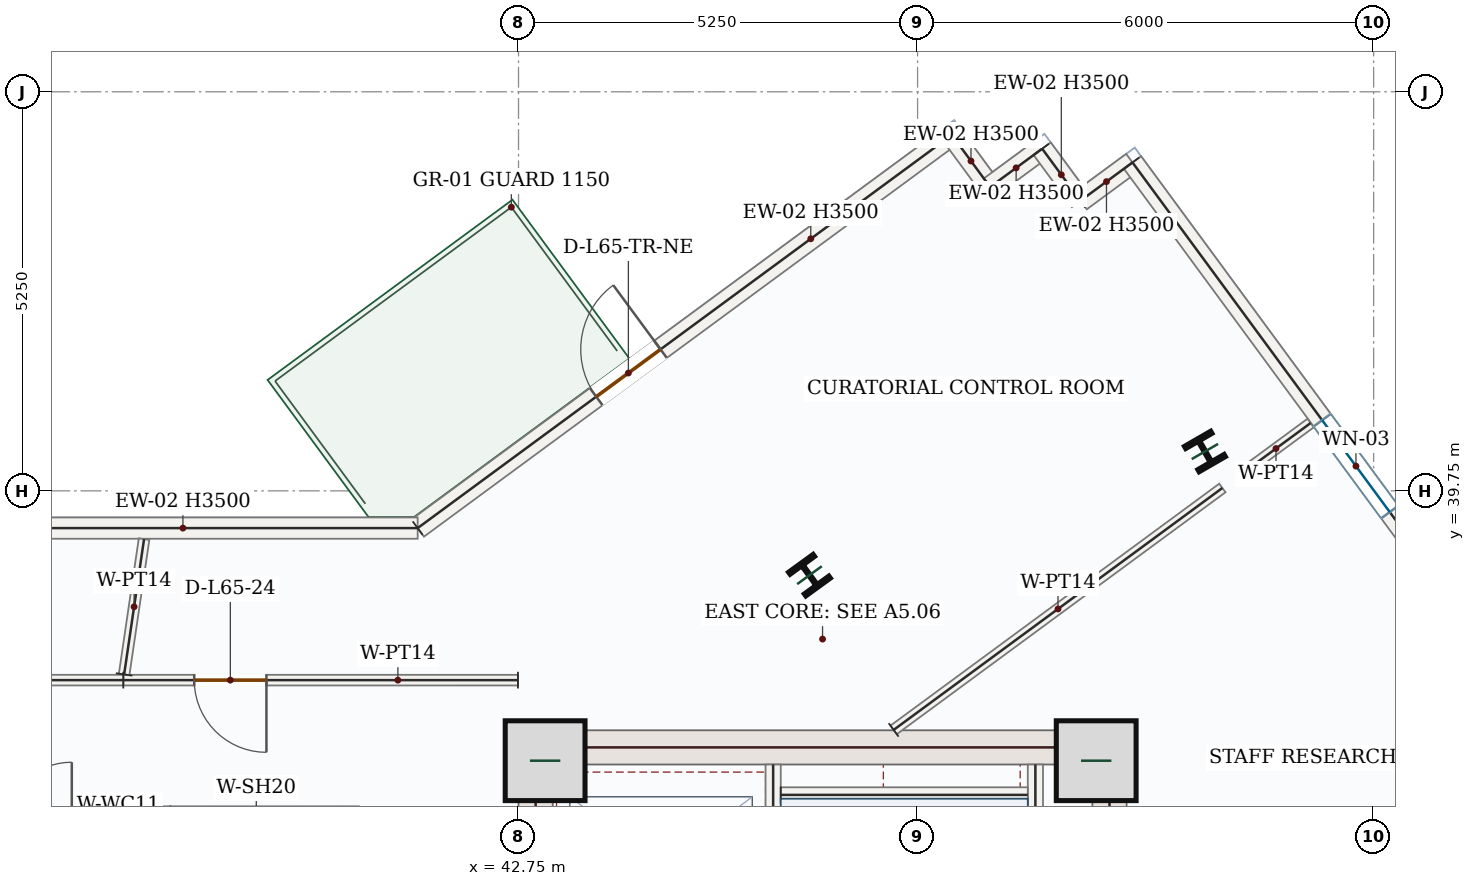
"""IFC4 building model, lengths in metres.
Left out: names, types, materials, properties, quantities, classifications, styles, units other than length and angle.
Written with IfcOpenShell. Run it as: python <this file> out.ifc"""

import sys

from ifc_helpers import new_model, si_unit, direction, frame, frame_2d, origin, origin_2d, place, context, subcontext, project, spatial, rectangle, i_section, extrude, source, transform, mapped, element, fill, save


model = new_model("IFC4")
c1 = context("Model", 3, precision=1e-05, world=origin(), true_north=direction((0.0, 1.0)))
c2 = subcontext(c1, "Body", "Model", "MODEL_VIEW")
j1 = project(units=[si_unit("LENGTHUNIT", "METRE"), si_unit("PLANEANGLEUNIT", "RADIAN")], contexts=[c1])
p1 = place(None, origin())
s1 = spatial("IfcSite", under=j1, at=p1, CompositionType="ELEMENT")
p2 = place(p1, origin())
s2 = spatial("IfcBuilding", under=s1, at=p2, CompositionType="ELEMENT")
p3 = place(p2, frame((0.0, 0.0, 272.85)))
s3 = spatial("IfcBuildingStorey", under=s2, at=p3, CompositionType="ELEMENT", Elevation=272.85)
p4 = place(p3, frame((42.975, 28.05, 0.0), z_axis=(0.0, 0.0, 1.0), x_axis=(0.0, 1.0, 0.0)))
e1 = element("IfcWall", 1, at=p4, inside=s3, PredefinedType="SHEAR", context=c2, shape_type="SweptSolid", body=[
    extrude(rectangle(XDim=8.55, YDim=0.45, at=frame_2d((4.275, 0.0))), origin(), (0.0, 0.0, 1.0), 3.5),
])
p5 = place(p4, frame((1.5, 0.0, 0.0)))
e2 = element("IfcOpeningElement", 2, at=p5, cuts=e1, PredefinedType="OPENING", context=c2, shape_type="SweptSolid", body=[
    extrude(rectangle(XDim=1.1, YDim=2.2, at=frame_2d((0.55, 1.1))), frame((0.0, 0.235, 0.0), z_axis=(0.0, -1.0, 0.0), x_axis=(1.0, 0.0, 0.0)), (0.0, 0.0, 1.0), 0.47),
])
m1 = source(origin(), c2, "Body", "SweptSolid", [
    extrude(rectangle(XDim=8.55, YDim=0.45, at=frame_2d((4.275, 0.0))), origin(), (0.0, 0.0, 1.0), 3.5),
])
p6 = place(p3, frame((50.525, 28.05, 0.0), z_axis=(0.0, 0.0, 1.0), x_axis=(0.0, 1.0, 0.0)))
e3 = element("IfcWall", 3, at=p6, inside=s3, PredefinedType="SHEAR", context=c2, shape_type="MappedRepresentation", body=[
    mapped(m1, transform((0.0, 0.0, 0.0), x_axis=(1.0, 0.0, 0.0), y_axis=(0.0, 1.0, 0.0), z_axis=(0.0, 0.0, 1.0), scale=1.0)),
])
m2 = source(origin(), c2, "Body", "SweptSolid", [
    extrude(rectangle(XDim=7.1, YDim=0.45, at=frame_2d((3.55, 0.0))), origin(), (0.0, 0.0, 1.0), 3.5),
])
p7 = place(p3, frame((43.2, 36.375, 0.0), z_axis=(0.0, 0.0, 1.0), x_axis=(1.0, 0.0, 0.0)))
e4 = element("IfcWall", 4, at=p7, inside=s3, PredefinedType="SHEAR", context=c2, shape_type="MappedRepresentation", body=[
    mapped(m2, transform((0.0, 0.0, 0.0), x_axis=(1.0, 0.0, 0.0), y_axis=(0.0, 1.0, 0.0), z_axis=(0.0, 0.0, 1.0), scale=1.0)),
])
m3 = source(origin(), c2, "Body", "SweptSolid", [
    extrude(rectangle(XDim=1.05, YDim=1.05, at=origin_2d()), origin(), (0.0, 0.0, 1.0), 3.75),
])
for number, where, z_axis, x_axis in (
    (5, (43.1, 36.2, 0.0), (0.0, 0.0, 1.0), (1.0, 0.0, 0.0)),
    (6, (50.35, 36.2, 0.0), (0.0, 0.0, 1.0), (1.0, 0.0, 0.0)),
):
    element("IfcColumn", number, at=place(p3, frame(where, z_axis=z_axis, x_axis=x_axis)), inside=s3, PredefinedType="COLUMN", context=c2, shape_type="MappedRepresentation", body=[
        mapped(m3, transform((0.0, 0.0, 0.0), x_axis=(1.0, 0.0, 0.0), y_axis=(0.0, 1.0, 0.0), z_axis=(0.0, 0.0, 1.0), scale=1.0)),
    ])
m4 = source(origin(), c2, "Body", "SweptSolid", [
    extrude(i_section(OverallWidth=0.399, OverallDepth=0.386, WebThickness=0.021, FlangeThickness=0.033, FilletRadius=0.018, at=origin_2d()), origin(), (0.0, 0.0, 1.0), 3.75),
])
for number, where, z_axis, x_axis in (
    (7, (46.578, 38.641, 0.0), (0.0, 0.0, 1.0), (0.809, 0.588, 0.0)),
    (8, (51.78, 40.268, 0.0), (0.0, 0.0, 1.0), (0.866, 0.5, 0.0)),
):
    element("IfcColumn", number, at=place(p3, frame(where, z_axis=z_axis, x_axis=x_axis)), inside=s3, PredefinedType="COLUMN", context=c2, shape_type="MappedRepresentation", body=[
        mapped(m4, transform((0.0, 0.0, 0.0), x_axis=(1.0, 0.0, 0.0), y_axis=(0.0, 1.0, 0.0), z_axis=(0.0, 0.0, 1.0), scale=1.0)),
    ])
p8 = place(p3, frame((41.423, 39.26, 0.0), z_axis=(0.0, 0.0, 1.0), x_axis=(0.805403112922, 0.592727446383, 0.0)))
e9 = element("IfcWall", 9, at=p8, inside=s3, PredefinedType="SOLIDWALL", context=c2, shape_type="SweptSolid", body=[
    extrude(rectangle(XDim=8.726, YDim=0.28, at=frame_2d((4.363, 0.0))), origin(), (0.0, 0.0, 1.0), 3.5),
])
p9 = place(p8, frame((2.917, 0.0, 0.0)))
e10 = element("IfcOpeningElement", 10, at=p9, cuts=e9, PredefinedType="OPENING", context=c2, shape_type="SweptSolid", body=[
    extrude(rectangle(XDim=1.05, YDim=2.15, at=frame_2d((0.525, 1.075))), frame((0.0, 0.15, 0.0), z_axis=(0.0, -1.0, 0.0), x_axis=(1.0, 0.0, 0.0)), (0.0, 0.0, 1.0), 0.3),
])
m5 = source(origin(), c2, "Body", "SweptSolid", [
    extrude(rectangle(XDim=0.85, YDim=0.28, at=frame_2d((0.425, 0.0))), origin(), (0.0, 0.0, 1.0), 3.5),
])
p10 = place(p3, frame((48.451, 44.432, 0.0), z_axis=(0.0, 0.0, 1.0), x_axis=(0.592807079659, -0.80534450163, 0.0)))
e11 = element("IfcWall", 11, at=p10, inside=s3, PredefinedType="SOLIDWALL", context=c2, shape_type="MappedRepresentation", body=[
    mapped(m5, transform((0.0, 0.0, 0.0), x_axis=(1.0, 0.0, 0.0), y_axis=(0.0, 1.0, 0.0), z_axis=(0.0, 0.0, 1.0), scale=1.0)),
])
m6 = source(origin(), c2, "Body", "SweptSolid", [
    extrude(rectangle(XDim=0.85, YDim=0.28, at=frame_2d((0.425, 0.0))), origin(), (0.0, 0.0, 1.0), 3.5),
])
for number, where, z_axis, x_axis in (
    (12, (48.955, 43.747, 0.0), (0.0, 0.0, 1.0), (0.805, 0.593, 0.0)),
    (13, (49.639, 44.251, 0.0), (0.0, 0.0, 1.0), (0.593, -0.805, 0.0)),
):
    element("IfcWall", number, at=place(p3, frame(where, z_axis=z_axis, x_axis=x_axis)), inside=s3, PredefinedType="SOLIDWALL", context=c2, shape_type="MappedRepresentation", body=[
        mapped(m6, transform((0.0, 0.0, 0.0), x_axis=(1.0, 0.0, 0.0), y_axis=(0.0, 1.0, 0.0), z_axis=(0.0, 0.0, 1.0), scale=1.0)),
    ])
p11 = place(p3, frame((50.143, 43.566, 0.0), z_axis=(0.0, 0.0, 1.0), x_axis=(0.80534450163, 0.592807079659, 0.0)))
e14 = element("IfcWall", 14, at=p11, inside=s3, PredefinedType="SOLIDWALL", context=c2, shape_type="MappedRepresentation", body=[
    mapped(m5, transform((0.0, 0.0, 0.0), x_axis=(1.0, 0.0, 0.0), y_axis=(0.0, 1.0, 0.0), z_axis=(0.0, 0.0, 1.0), scale=1.0)),
])
p12 = place(p3, frame((50.827, 44.07, 0.0), z_axis=(0.0, 0.0, 1.0), x_axis=(0.592722097771, -0.805407049146, 0.0)))
e15 = element("IfcWall", 15, at=p12, inside=s3, PredefinedType="SOLIDWALL", context=c2, shape_type="SweptSolid", body=[
    extrude(rectangle(XDim=9.92, YDim=0.28, at=frame_2d((4.96, 0.0))), origin(), (0.0, 0.0, 1.0), 3.5),
])
p13 = place(p12, frame((4.21, 0.0, 0.85)))
e16 = element("IfcOpeningElement", 16, at=p13, cuts=e15, PredefinedType="OPENING", context=c2, shape_type="SweptSolid", body=[
    extrude(rectangle(XDim=1.5, YDim=1.5, at=frame_2d((0.75, 0.75))), frame((0.0, 0.15, 0.0), z_axis=(0.0, -1.0, 0.0), x_axis=(1.0, 0.0, 0.0)), (0.0, 0.0, 1.0), 0.3),
])
m7 = source(origin(), c2, "Body", "SweptSolid", [
    extrude(rectangle(XDim=6.177, YDim=0.28, at=frame_2d((3.088, 0.0))), origin(), (0.0, 0.0, 1.0), 3.5),
])
p14 = place(p3, frame((35.247, 39.26, 0.0), z_axis=(0.0, 0.0, 1.0), x_axis=(1.0, 0.0, 0.0)))
e17 = element("IfcWall", 17, at=p14, inside=s3, PredefinedType="SOLIDWALL", context=c2, shape_type="MappedRepresentation", body=[
    mapped(m7, transform((0.0, 0.0, 0.0), x_axis=(1.0, 0.0, 0.0), y_axis=(0.0, 1.0, 0.0), z_axis=(0.0, 0.0, 1.0), scale=1.0)),
])
m8 = source(origin(), c2, "Body", "SweptSolid", [
    extrude(rectangle(XDim=7.87, YDim=0.2, at=frame_2d((3.935, 0.0))), origin(), (0.0, 0.0, 1.0), 3.5),
])
p15 = place(p3, frame((49.55, 28.28, 0.0), z_axis=(0.0, 0.0, 1.0), x_axis=(0.0, 1.0, 0.0)))
e18 = element("IfcWall", 18, at=p15, inside=s3, PredefinedType="SOLIDWALL", context=c2, shape_type="MappedRepresentation", body=[
    mapped(m8, transform((0.0, 0.0, 0.0), x_axis=(1.0, 0.0, 0.0), y_axis=(0.0, 1.0, 0.0), z_axis=(0.0, 0.0, 1.0), scale=1.0)),
])
p16 = place(p3, frame((46.1, 28.15, 0.0), z_axis=(0.0, 0.0, 1.0), x_axis=(0.0, 1.0, 0.0)))
e19 = element("IfcWall", 19, at=p16, inside=s3, PredefinedType="SOLIDWALL", context=c2, shape_type="SweptSolid", body=[
    extrude(rectangle(XDim=8.0, YDim=0.2, at=frame_2d((4.0, 0.0))), origin(), (0.0, 0.0, 1.0), 3.5),
])
p17 = place(p16, frame((0.4, 0.0, 0.0)))
e20 = element("IfcOpeningElement", 20, at=p17, cuts=e19, PredefinedType="OPENING", context=c2, shape_type="SweptSolid", body=[
    extrude(rectangle(XDim=1.05, YDim=2.15, at=frame_2d((0.525, 1.075))), frame((0.0, 0.11, 0.0), z_axis=(0.0, -1.0, 0.0), x_axis=(1.0, 0.0, 0.0)), (0.0, 0.0, 1.0), 0.22),
])
m9 = source(origin(), c2, "Body", "SweptSolid", [
    extrude(rectangle(XDim=3.25, YDim=0.2, at=frame_2d((1.625, 0.0))), origin(), (0.0, 0.0, 1.0), 3.5),
])
p18 = place(p3, frame((46.2, 35.75, 0.0), z_axis=(0.0, 0.0, 1.0), x_axis=(1.0, 0.0, 0.0)))
e21 = element("IfcWall", 21, at=p18, inside=s3, PredefinedType="SOLIDWALL", context=c2, shape_type="MappedRepresentation", body=[
    mapped(m9, transform((0.0, 0.0, 0.0), x_axis=(1.0, 0.0, 0.0), y_axis=(0.0, 1.0, 0.0), z_axis=(0.0, 0.0, 1.0), scale=1.0)),
])
m10 = source(origin(), c2, "Body", "SweptSolid", [
    extrude(rectangle(XDim=2.4, YDim=0.2, at=frame_2d((1.2, 0.0))), origin(), (0.0, 0.0, 1.0), 3.5),
])
p19 = place(p3, frame((38.05, 33.2, 0.0), z_axis=(0.0, 0.0, 1.0), x_axis=(0.0, 1.0, 0.0)))
e22 = element("IfcWall", 22, at=p19, inside=s3, PredefinedType="SOLIDWALL", context=c2, shape_type="MappedRepresentation", body=[
    mapped(m10, transform((0.0, 0.0, 0.0), x_axis=(1.0, 0.0, 0.0), y_axis=(0.0, 1.0, 0.0), z_axis=(0.0, 0.0, 1.0), scale=1.0)),
])
p20 = place(p3, frame((40.55, 33.2, 0.0), z_axis=(0.0, 0.0, 1.0), x_axis=(0.0, 1.0, 0.0)))
e23 = element("IfcWall", 23, at=p20, inside=s3, PredefinedType="SOLIDWALL", context=c2, shape_type="SweptSolid", body=[
    extrude(rectangle(XDim=2.4, YDim=0.2, at=frame_2d((1.2, 0.0))), origin(), (0.0, 0.0, 1.0), 3.5),
])
p21 = place(p20, frame((0.65, 0.0, 0.0)))
e24 = element("IfcOpeningElement", 24, at=p21, cuts=e23, PredefinedType="OPENING", context=c2, shape_type="SweptSolid", body=[
    extrude(rectangle(XDim=1.1, YDim=2.15, at=frame_2d((0.55, 1.075))), frame((0.0, 0.11, 0.0), z_axis=(0.0, -1.0, 0.0), x_axis=(1.0, 0.0, 0.0)), (0.0, 0.0, 1.0), 0.22),
])
m11 = source(origin(), c2, "Body", "SweptSolid", [
    extrude(rectangle(XDim=5.37, YDim=0.14, at=frame_2d((2.685, 0.0))), origin(), (0.0, 0.0, 1.0), 3.5),
])
p22 = place(p3, frame((47.685, 36.605, 0.0), z_axis=(0.0, 0.0, 1.0), x_axis=(0.805412248971, 0.592715032041, 0.0)))
e25 = element("IfcWall", 25, at=p22, inside=s3, PredefinedType="PARTITIONING", context=c2, shape_type="MappedRepresentation", body=[
    mapped(m11, transform((0.0, 0.0, 0.0), x_axis=(1.0, 0.0, 0.0), y_axis=(0.0, 1.0, 0.0), z_axis=(0.0, 0.0, 1.0), scale=1.0)),
])
m12 = source(origin(), c2, "Body", "SweptSolid", [
    extrude(rectangle(XDim=1.13, YDim=0.14, at=frame_2d((0.565, 0.0))), origin(), (0.0, 0.0, 1.0), 3.5),
])
p23 = place(p3, frame((52.26, 39.972, 0.0), z_axis=(0.0, 0.0, 1.0), x_axis=(0.805359802525, 0.592786292416, 0.0)))
e26 = element("IfcWall", 26, at=p23, inside=s3, PredefinedType="PARTITIONING", context=c2, shape_type="MappedRepresentation", body=[
    mapped(m12, transform((0.0, 0.0, 0.0), x_axis=(1.0, 0.0, 0.0), y_axis=(0.0, 1.0, 0.0), z_axis=(0.0, 0.0, 1.0), scale=1.0)),
])
p24 = place(p3, frame((42.742, 37.26, 0.0), z_axis=(0.0, 0.0, 1.0), x_axis=(-0.999999998895, 4.7021207e-05, 0.0)))
e27 = element("IfcWall", 27, at=p24, inside=s3, PredefinedType="PARTITIONING", context=c2, shape_type="SweptSolid", body=[
    extrude(rectangle(XDim=5.192, YDim=0.14, at=frame_2d((2.596, 0.0))), origin(), (0.0, 0.0, 1.0), 3.5),
])
p25 = place(p24, frame((3.309, 0.0, 0.0)))
e28 = element("IfcOpeningElement", 28, at=p25, cuts=e27, PredefinedType="OPENING", context=c2, shape_type="SweptSolid", body=[
    extrude(rectangle(XDim=0.95, YDim=2.15, at=frame_2d((0.475, 1.075))), frame((0.0, 0.08, 0.0), z_axis=(0.0, -1.0, 0.0), x_axis=(1.0, 0.0, 0.0)), (0.0, 0.0, 1.0), 0.16),
])
m13 = source(origin(), c2, "Body", "SweptSolid", [
    extrude(rectangle(XDim=1.799, YDim=0.14, at=frame_2d((0.9, 0.0))), origin(), (0.0, 0.0, 1.0), 3.5),
])
p26 = place(p3, frame((37.561, 37.335, 0.0), z_axis=(0.0, 0.0, 1.0), x_axis=(0.14573227875, 0.989324063657, 0.0)))
e29 = element("IfcWall", 29, at=p26, inside=s3, PredefinedType="PARTITIONING", context=c2, shape_type="MappedRepresentation", body=[
    mapped(m13, transform((0.0, 0.0, 0.0), x_axis=(1.0, 0.0, 0.0), y_axis=(0.0, 1.0, 0.0), z_axis=(0.0, 0.0, 1.0), scale=1.0)),
])
p27 = place(p3, frame((37.55, 37.26, 0.0), z_axis=(0.0, 0.0, 1.0), x_axis=(-0.999999998268, -5.8852956e-05, 0.0)))
e30 = element("IfcWall", 30, at=p27, inside=s3, PredefinedType="PARTITIONING", context=c2, shape_type="SweptSolid", body=[
    extrude(rectangle(XDim=8.297, YDim=0.14, at=frame_2d((4.148, 0.0))), origin(), (0.0, 0.0, 1.0), 3.5),
])
p28 = place(p27, frame((1.616, 0.0, 0.0)))
e31 = element("IfcOpeningElement", 31, at=p28, cuts=e30, PredefinedType="OPENING", context=c2, shape_type="SweptSolid", body=[
    extrude(rectangle(XDim=0.95, YDim=2.15, at=frame_2d((0.475, 1.075))), frame((0.0, 0.08, 0.0), z_axis=(0.0, -1.0, 0.0), x_axis=(1.0, 0.0, 0.0)), (0.0, 0.0, 1.0), 0.16),
])
m14 = source(origin(), c2, "Body", "SweptSolid", [
    extrude(rectangle(XDim=1.05, YDim=2.15, at=frame_2d((0.525, 1.075))), frame((0.0, 0.025, 0.0), z_axis=(0.0, -1.0, 0.0), x_axis=(1.0, 0.0, 0.0)), (0.0, 0.0, 1.0), 0.05),
])
p29 = place(p9, origin())
e32 = element("IfcDoor", 32, at=p29, inside=s3, OperationType="SINGLE_SWING_RIGHT", PredefinedType="DOOR", context=c2, shape_type="MappedRepresentation", body=[
    mapped(m14, transform((0.0, 0.0, 0.0), x_axis=(1.0, 0.0, 0.0), y_axis=(0.0, 1.0, 0.0), z_axis=(0.0, 0.0, 1.0), scale=1.0)),
])
fill(e10, e32)
m15 = source(origin(), c2, "Body", "SweptSolid", [
    extrude(rectangle(XDim=1.5, YDim=1.5, at=frame_2d((0.75, 0.75))), frame((0.0, 0.03, 0.0), z_axis=(0.0, -1.0, 0.0), x_axis=(1.0, 0.0, 0.0)), (0.0, 0.0, 1.0), 0.06),
])
p30 = place(p13, origin())
e33 = element("IfcWindow", 33, at=p30, inside=s3, PartitioningType="SINGLE_PANEL", PredefinedType="WINDOW", context=c2, shape_type="MappedRepresentation", body=[
    mapped(m15, transform((0.0, 0.0, 0.0), x_axis=(1.0, 0.0, 0.0), y_axis=(0.0, 1.0, 0.0), z_axis=(0.0, 0.0, 1.0), scale=1.0)),
])
fill(e16, e33)
m16 = source(origin(), c2, "Body", "SweptSolid", [
    extrude(rectangle(XDim=0.95, YDim=2.15, at=frame_2d((0.475, 1.075))), frame((0.0, 0.025, 0.0), z_axis=(0.0, -1.0, 0.0), x_axis=(1.0, 0.0, 0.0)), (0.0, 0.0, 1.0), 0.05),
])
p31 = place(p25, origin())
e34 = element("IfcDoor", 34, at=p31, inside=s3, OperationType="SINGLE_SWING_LEFT", PredefinedType="DOOR", context=c2, shape_type="MappedRepresentation", body=[
    mapped(m16, transform((0.0, 0.0, 0.0), x_axis=(1.0, 0.0, 0.0), y_axis=(0.0, 1.0, 0.0), z_axis=(0.0, 0.0, 1.0), scale=1.0)),
])
fill(e28, e34)
save(model, sys.argv[1])
